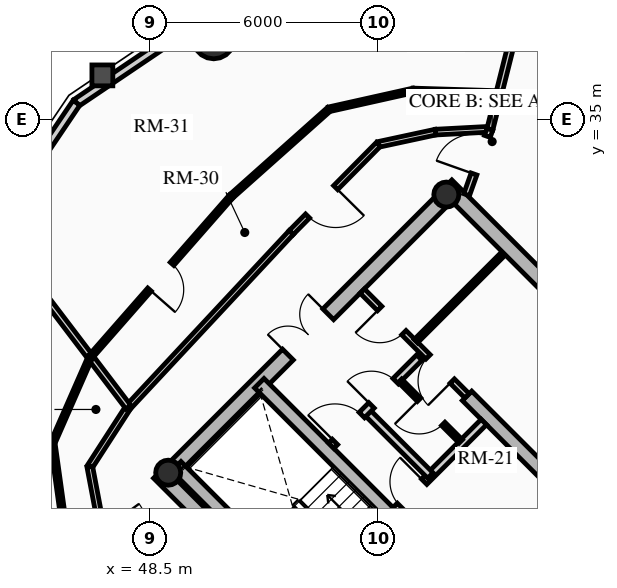
"""IFC4 building model, lengths in metres.
Left out: names, types, materials, properties, quantities, classifications, styles, units other than length and angle.
Written with IfcOpenShell. Run it as: python <this file> out.ifc"""

import sys

from ifc_helpers import new_model, si_unit, direction, frame, frame_2d, origin, origin_2d, place, context, subcontext, project, spatial, rectangle, circle, hollow_circle, extrude, source, transform, mapped, element, fill, save


model = new_model("IFC4")
c1 = context("Model", 3, precision=1e-05, world=origin(), true_north=direction((0.0, 1.0)))
c2 = subcontext(c1, "Body", "Model", "MODEL_VIEW")
j1 = project(units=[si_unit("LENGTHUNIT", "METRE"), si_unit("PLANEANGLEUNIT", "RADIAN")], contexts=[c1])
p1 = place(None, origin())
s1 = spatial("IfcSite", under=j1, at=p1, CompositionType="ELEMENT")
p2 = place(p1, origin())
s2 = spatial("IfcBuilding", under=s1, at=p2, CompositionType="ELEMENT")
p3 = place(p2, frame((0.0, 0.0, 222.85)))
s3 = spatial("IfcBuildingStorey", under=s2, at=p3, CompositionType="ELEMENT", Elevation=222.85)
for number, where, z_axis, x_axis in (
    (1, (58.702, 15.732, 0.0), (0.0, 0.0, 1.0), (-0.707, 0.707, 0.0)),
    (2, (66.268, 23.298, 0.0), (0.0, 0.0, 1.0), (-0.707, 0.707, 0.0)),
):
    element("IfcWall", number, at=place(p3, frame(where, z_axis=z_axis, x_axis=x_axis)), inside=s3, PredefinedType="SHEAR", context=c2, shape_type="SweptSolid", body=[
        extrude(rectangle(XDim=14.1, YDim=0.4, at=frame_2d((7.05, 0.0))), origin(), (0.0, 0.0, 1.0), 3.2),
    ])
p4 = place(p3, frame((48.873, 25.561, 0.0), z_axis=(0.0, 0.0, 1.0), x_axis=(0.707106781187, 0.707106781187, 0.0)))
e3 = element("IfcWall", 3, at=p4, inside=s3, PredefinedType="SHEAR", context=c2, shape_type="SweptSolid", body=[
    extrude(rectangle(XDim=10.7, YDim=0.4, at=frame_2d((5.35, 0.0))), origin(), (0.0, 0.0, 1.0), 3.2),
])
m1 = source(origin(), c2, "Body", "SweptSolid", [
    extrude(rectangle(XDim=1.5, YDim=2.02, at=frame_2d((0.75, 1.01))), frame((0.0, 0.21, 0.0), z_axis=(0.0, -1.0, 0.0), x_axis=(1.0, 0.0, 0.0)), (0.0, 0.0, 1.0), 0.42),
])
p5 = place(p4, frame((4.6, 0.0, 0.0)))
e4 = element("IfcOpeningElement", 4, at=p5, cuts=e3, PredefinedType="OPENING", context=c2, shape_type="MappedRepresentation", body=[
    mapped(m1, transform((0.0, 0.0, 0.0), x_axis=(1.0, 0.0, 0.0), y_axis=(0.0, 1.0, 0.0), z_axis=(0.0, 0.0, 1.0), scale=1.0)),
])
p6 = place(p3, frame((61.06, 18.373, 0.0), z_axis=(0.0, 0.0, 1.0), x_axis=(-0.707106781187, 0.707106781187, 0.0)))
e5 = element("IfcWall", 5, at=p6, inside=s3, PredefinedType="SHEAR", context=c2, shape_type="SweptSolid", body=[
    extrude(rectangle(XDim=13.7, YDim=0.35, at=frame_2d((6.85, 0.0))), origin(), (0.0, 0.0, 1.0), 3.2),
])
m2 = source(origin(), c2, "Body", "SweptSolid", [
    extrude(rectangle(XDim=1.1, YDim=2.015, at=frame_2d((0.55, 1.007))), frame((0.0, 0.185, 0.0), z_axis=(0.0, -1.0, 0.0), x_axis=(1.0, 0.0, 0.0)), (0.0, 0.0, 1.0), 0.37),
])
p7 = place(p6, frame((4.85, 0.0, 0.0)))
e6 = element("IfcOpeningElement", 6, at=p7, cuts=e5, PredefinedType="OPENING", context=c2, shape_type="MappedRepresentation", body=[
    mapped(m2, transform((0.0, 0.0, 0.0), x_axis=(1.0, 0.0, 0.0), y_axis=(0.0, 1.0, 0.0), z_axis=(0.0, 0.0, 1.0), scale=1.0)),
])
p8 = place(p6, frame((0.625, 0.0, 0.0)))
e7 = element("IfcOpeningElement", 7, at=p8, cuts=e5, PredefinedType="OPENING", context=c2, shape_type="MappedRepresentation", body=[
    mapped(m2, transform((0.0, 0.0, 0.0), x_axis=(1.0, 0.0, 0.0), y_axis=(0.0, 1.0, 0.0), z_axis=(0.0, 0.0, 1.0), scale=1.0)),
])
p9 = place(p6, frame((2.625, 0.0, 0.0)))
e8 = element("IfcOpeningElement", 8, at=p9, cuts=e5, PredefinedType="OPENING", context=c2, shape_type="MappedRepresentation", body=[
    mapped(m2, transform((0.0, 0.0, 0.0), x_axis=(1.0, 0.0, 0.0), y_axis=(0.0, 1.0, 0.0), z_axis=(0.0, 0.0, 1.0), scale=1.0)),
])
m3 = source(origin(), c2, "Body", "SweptSolid", [
    extrude(rectangle(XDim=1.15, YDim=2.02, at=frame_2d((0.575, 1.01))), frame((0.0, 0.185, 0.0), z_axis=(0.0, -1.0, 0.0), x_axis=(1.0, 0.0, 0.0)), (0.0, 0.0, 1.0), 0.37),
])
p10 = place(p6, frame((7.27, 0.0, 0.0)))
e9 = element("IfcOpeningElement", 9, at=p10, cuts=e5, PredefinedType="OPENING", context=c2, shape_type="MappedRepresentation", body=[
    mapped(m3, transform((0.0, 0.0, 0.0), x_axis=(1.0, 0.0, 0.0), y_axis=(0.0, 1.0, 0.0), z_axis=(0.0, 0.0, 1.0), scale=1.0)),
])
p11 = place(p3, frame((63.627, 20.94, 0.0), z_axis=(0.0, 0.0, 1.0), x_axis=(-0.707119496762, 0.707094065383, 0.0)))
e10 = element("IfcWall", 10, at=p11, inside=s3, PredefinedType="SHEAR", context=c2, shape_type="SweptSolid", body=[
    extrude(rectangle(XDim=9.6, YDim=0.35, at=frame_2d((4.8, 0.0))), origin(), (0.0, 0.0, 1.0), 3.2),
])
p12 = place(p11, frame((5.28, 0.0, 0.0)))
e11 = element("IfcOpeningElement", 11, at=p12, cuts=e10, PredefinedType="OPENING", context=c2, shape_type="MappedRepresentation", body=[
    mapped(m3, transform((0.0, 0.0, 0.0), x_axis=(1.0, 0.0, 0.0), y_axis=(0.0, 1.0, 0.0), z_axis=(0.0, 0.0, 1.0), scale=1.0)),
])
p13 = place(p3, frame((53.922, 21.141, 0.0), z_axis=(0.0, 0.0, 1.0), x_axis=(-0.707106781187, 0.707106781187, 0.0)))
e12 = element("IfcWall", 12, at=p13, inside=s3, PredefinedType="SHEAR", context=c2, shape_type="SweptSolid", body=[
    extrude(rectangle(XDim=6.695, YDim=0.35, at=frame_2d((3.348, 0.0))), origin(), (0.0, 0.0, 1.0), 3.2),
])
for number, where, z_axis, x_axis in (
    (13, (48.976, 25.706, 0.0), (0.0, 0.0, 1.0), (0.707, 0.707, 0.0)),
    (14, (56.294, 33.024, 0.0), (0.0, 0.0, 1.0), (0.707, 0.707, 0.0)),
):
    element("IfcColumn", number, at=place(p3, frame(where, z_axis=z_axis, x_axis=x_axis)), inside=s3, PredefinedType="COLUMN", context=c2, shape_type="SweptSolid", body=[
        extrude(hollow_circle(Radius=0.33, WallThickness=0.025, at=origin_2d()), origin(), (0.0, 0.0, 1.0), 3.2),
    ])
p14 = place(p3, frame((50.173, 37.146, 0.0), z_axis=(0.0, 0.0, 1.0), x_axis=(1.0, 0.0, 0.0)))
e15 = element("IfcColumn", 15, at=p14, inside=s3, PredefinedType="USERDEFINED", context=c2, shape_type="SweptSolid", body=[
    extrude(circle(Radius=0.55, at=origin_2d()), origin(), (0.0, 0.0, 1.0), 3.2),
])
p15 = place(p3, frame((46.561, 35.439, 0.0), z_axis=(0.0, 0.0, 1.0), x_axis=(0.828833723692, 0.559495003079, 0.0)))
e16 = element("IfcWall", 16, at=p15, inside=s3, PredefinedType="SOLIDWALL", context=c2, shape_type="SweptSolid", body=[
    extrude(rectangle(XDim=3.976, YDim=0.22, at=frame_2d((1.988, 0.0))), origin(), (0.0, 0.0, 1.0), 2.612),
])
p16 = place(p3, frame((44.337, 32.144, 0.0), z_axis=(0.0, 0.0, 1.0), x_axis=(0.559495003079, 0.828833723692, 0.0)))
e17 = element("IfcWall", 17, at=p16, inside=s3, PredefinedType="SOLIDWALL", context=c2, shape_type="SweptSolid", body=[
    extrude(rectangle(XDim=3.976, YDim=0.22, at=frame_2d((1.988, 0.0))), origin(), (0.0, 0.0, 1.0), 2.612),
])
m4 = source(origin(), c2, "Body", "SweptSolid", [
    extrude(rectangle(XDim=1.05, YDim=1.3, at=frame_2d((0.525, 0.65))), frame((0.0, 0.12, 0.0), z_axis=(0.0, -1.0, 0.0), x_axis=(1.0, 0.0, 0.0)), (0.0, 0.0, 1.0), 0.24),
])
p17 = place(p16, frame((1.463, 0.0, 0.65)))
e18 = element("IfcOpeningElement", 18, at=p17, cuts=e17, PredefinedType="OPENING", context=c2, shape_type="MappedRepresentation", body=[
    mapped(m4, transform((0.0, 0.0, 0.0), x_axis=(1.0, 0.0, 0.0), y_axis=(0.0, 1.0, 0.0), z_axis=(0.0, 0.0, 1.0), scale=1.0)),
])
p18 = place(p3, frame((54.961, 24.719, 0.0), z_axis=(0.0, 0.0, 1.0), x_axis=(0.707106781187, 0.707106781187, 0.0)))
e19 = element("IfcWall", 19, at=p18, inside=s3, PredefinedType="PARTITIONING", context=c2, shape_type="SweptSolid", body=[
    extrude(rectangle(XDim=3.28, YDim=0.2, at=frame_2d((1.64, 0.0))), origin(), (0.0, 0.0, 1.0), 2.975),
])
m5 = source(origin(), c2, "Body", "SweptSolid", [
    extrude(rectangle(XDim=0.9, YDim=2.005, at=frame_2d((0.45, 1.002))), frame((0.0, 0.11, 0.0), z_axis=(0.0, -1.0, 0.0), x_axis=(1.0, 0.0, 0.0)), (0.0, 0.0, 1.0), 0.22),
])
p19 = place(p18, frame((0.16, 0.0, 0.0)))
e20 = element("IfcOpeningElement", 20, at=p19, cuts=e19, PredefinedType="OPENING", context=c2, shape_type="MappedRepresentation", body=[
    mapped(m5, transform((0.0, 0.0, 0.0), x_axis=(1.0, 0.0, 0.0), y_axis=(0.0, 1.0, 0.0), z_axis=(0.0, 0.0, 1.0), scale=1.0)),
])
p20 = place(p3, frame((55.874, 25.631, 0.0), z_axis=(0.0, 0.0, 1.0), x_axis=(-0.707157639372, 0.707055919343, 0.0)))
e21 = element("IfcWall", 21, at=p20, inside=s3, PredefinedType="PARTITIONING", context=c2, shape_type="SweptSolid", body=[
    extrude(rectangle(XDim=2.4, YDim=0.2, at=frame_2d((1.2, 0.0))), origin(), (0.0, 0.0, 1.0), 2.975),
])
p21 = place(p3, frame((53.264, 26.416, 0.0), z_axis=(0.0, 0.0, 1.0), x_axis=(0.707106781187, 0.707106781187, 0.0)))
e22 = element("IfcWall", 22, at=p21, inside=s3, PredefinedType="PARTITIONING", context=c2, shape_type="SweptSolid", body=[
    extrude(rectangle(XDim=3.28, YDim=0.2, at=frame_2d((1.64, 0.0))), origin(), (0.0, 0.0, 1.0), 2.975),
])
m6 = source(origin(), c2, "Body", "SweptSolid", [
    extrude(rectangle(XDim=1.0, YDim=2.015, at=frame_2d((0.5, 1.007))), frame((0.0, 0.11, 0.0), z_axis=(0.0, -1.0, 0.0), x_axis=(1.0, 0.0, 0.0)), (0.0, 0.0, 1.0), 0.22),
])
p22 = place(p21, frame((0.14, 0.0, 0.0)))
e23 = element("IfcOpeningElement", 23, at=p22, cuts=e22, PredefinedType="OPENING", context=c2, shape_type="MappedRepresentation", body=[
    mapped(m6, transform((0.0, 0.0, 0.0), x_axis=(1.0, 0.0, 0.0), y_axis=(0.0, 1.0, 0.0), z_axis=(0.0, 0.0, 1.0), scale=1.0)),
])
p23 = place(p21, frame((1.5, 0.0, 0.0)))
e24 = element("IfcOpeningElement", 24, at=p23, cuts=e22, PredefinedType="OPENING", context=c2, shape_type="MappedRepresentation", body=[
    mapped(m5, transform((0.0, 0.0, 0.0), x_axis=(1.0, 0.0, 0.0), y_axis=(0.0, 1.0, 0.0), z_axis=(0.0, 0.0, 1.0), scale=1.0)),
])
p24 = place(p3, frame((56.673, 26.529, 0.0), z_axis=(0.0, 0.0, 1.0), x_axis=(-0.707052764397, 0.70716079385, 0.0)))
e25 = element("IfcWall", 25, at=p24, inside=s3, PredefinedType="PARTITIONING", context=c2, shape_type="SweptSolid", body=[
    extrude(rectangle(XDim=2.26, YDim=0.125, at=frame_2d((1.13, 0.0))), origin(), (0.0, 0.0, 1.0), 2.975),
])
m7 = source(origin(), c2, "Body", "SweptSolid", [
    extrude(rectangle(XDim=0.9, YDim=2.005, at=frame_2d((0.45, 1.002))), frame((0.0, 0.073, 0.0), z_axis=(0.0, -1.0, 0.0), x_axis=(1.0, 0.0, 0.0)), (0.0, 0.0, 1.0), 0.145),
])
p25 = place(p24, frame((0.65, 0.0, 0.0)))
e26 = element("IfcOpeningElement", 26, at=p25, cuts=e25, PredefinedType="OPENING", context=c2, shape_type="MappedRepresentation", body=[
    mapped(m7, transform((0.0, 0.0, 0.0), x_axis=(1.0, 0.0, 0.0), y_axis=(0.0, 1.0, 0.0), z_axis=(0.0, 0.0, 1.0), scale=1.0)),
])
p26 = place(p3, frame((56.839, 27.728, 0.0), z_axis=(0.0, 0.0, 1.0), x_axis=(-0.707106781187, 0.707106781187, 0.0)))
e27 = element("IfcWall", 27, at=p26, inside=s3, PredefinedType="PARTITIONING", context=c2, shape_type="SweptSolid", body=[
    extrude(rectangle(XDim=3.9, YDim=0.16, at=frame_2d((1.95, 0.0))), origin(), (0.0, 0.0, 1.0), 2.975),
])
m8 = source(origin(), c2, "Body", "SweptSolid", [
    extrude(rectangle(XDim=0.9, YDim=2.005, at=frame_2d((0.45, 1.002))), frame((0.0, 0.09, 0.0), z_axis=(0.0, -1.0, 0.0), x_axis=(1.0, 0.0, 0.0)), (0.0, 0.0, 1.0), 0.18),
])
p27 = place(p26, frame((0.55, 0.0, 0.0)))
e28 = element("IfcOpeningElement", 28, at=p27, cuts=e27, PredefinedType="OPENING", context=c2, shape_type="MappedRepresentation", body=[
    mapped(m8, transform((0.0, 0.0, 0.0), x_axis=(1.0, 0.0, 0.0), y_axis=(0.0, 1.0, 0.0), z_axis=(0.0, 0.0, 1.0), scale=1.0)),
])
p28 = place(p26, frame((2.35, 0.0, 0.0)))
e29 = element("IfcOpeningElement", 29, at=p28, cuts=e27, PredefinedType="OPENING", context=c2, shape_type="MappedRepresentation", body=[
    mapped(m8, transform((0.0, 0.0, 0.0), x_axis=(1.0, 0.0, 0.0), y_axis=(0.0, 1.0, 0.0), z_axis=(0.0, 0.0, 1.0), scale=1.0)),
])
p29 = place(p3, frame((55.492, 29.167, 0.0), z_axis=(0.0, 0.0, 1.0), x_axis=(0.707144688645, 0.707068871696, 0.0)))
e30 = element("IfcWall", 30, at=p29, inside=s3, PredefinedType="PARTITIONING", context=c2, shape_type="SweptSolid", body=[
    extrude(rectangle(XDim=3.22, YDim=0.125, at=frame_2d((1.61, 0.0))), origin(), (0.0, 0.0, 1.0), 2.512),
])
p30 = place(p3, frame((57.44, 34.744, 0.0), z_axis=(0.0, 0.0, 1.0), x_axis=(-0.998578025565, -0.053309725738, 0.0)))
e31 = element("IfcWall", 31, at=p30, inside=s3, PredefinedType="PARTITIONING", context=c2, shape_type="SweptSolid", body=[
    extrude(rectangle(XDim=1.433, YDim=0.15, at=frame_2d((0.717, 0.0))), origin(), (0.0, 0.0, 1.0), 2.612),
])
p31 = place(p3, frame((56.009, 34.667, 0.0), z_axis=(0.0, 0.0, 1.0), x_axis=(-0.977625498152, -0.210353001795, 0.0)))
e32 = element("IfcWall", 32, at=p31, inside=s3, PredefinedType="PARTITIONING", context=c2, shape_type="SweptSolid", body=[
    extrude(rectangle(XDim=1.538, YDim=0.15, at=frame_2d((0.769, 0.0))), origin(), (0.0, 0.0, 1.0), 2.545),
])
p32 = place(p3, frame((54.506, 34.344, 0.0), z_axis=(0.0, 0.0, 1.0), x_axis=(-0.703053402247, -0.711137056824, 0.0)))
e33 = element("IfcWall", 33, at=p32, inside=s3, PredefinedType="PARTITIONING", context=c2, shape_type="SweptSolid", body=[
    extrude(rectangle(XDim=3.262, YDim=0.15, at=frame_2d((1.631, 0.0))), origin(), (0.0, 0.0, 1.0), 2.612),
])
m9 = source(origin(), c2, "Body", "SweptSolid", [
    extrude(rectangle(XDim=1.05, YDim=2.015, at=frame_2d((0.525, 1.007))), frame((0.0, 0.085, 0.0), z_axis=(0.0, -1.0, 0.0), x_axis=(1.0, 0.0, 0.0)), (0.0, 0.0, 1.0), 0.17),
])
p33 = place(p32, frame((1.599, 0.0, 0.0)))
e34 = element("IfcOpeningElement", 34, at=p33, cuts=e33, PredefinedType="OPENING", context=c2, shape_type="MappedRepresentation", body=[
    mapped(m9, transform((0.0, 0.0, 0.0), x_axis=(1.0, 0.0, 0.0), y_axis=(0.0, 1.0, 0.0), z_axis=(0.0, 0.0, 1.0), scale=1.0)),
])
p34 = place(p3, frame((52.212, 32.024, 0.0), z_axis=(0.0, 0.0, 1.0), x_axis=(-0.682158998173, -0.731203871169, 0.0)))
e35 = element("IfcWall", 35, at=p34, inside=s3, PredefinedType="PARTITIONING", context=c2, shape_type="SweptSolid", body=[
    extrude(rectangle(XDim=6.282, YDim=0.15, at=frame_2d((3.141, 0.0))), origin(), (0.0, 0.0, 1.0), 2.545),
])
p35 = place(p3, frame((47.927, 27.431, 0.0), z_axis=(0.0, 0.0, 1.0), x_axis=(-0.543126643356, -0.839650790077, 0.0)))
e36 = element("IfcWall", 36, at=p35, inside=s3, PredefinedType="PARTITIONING", context=c2, shape_type="SweptSolid", body=[
    extrude(rectangle(XDim=1.868, YDim=0.15, at=frame_2d((0.934, 0.0))), origin(), (0.0, 0.0, 1.0), 2.545),
])
p36 = place(p3, frame((46.912, 25.862, 0.0), z_axis=(0.0, 0.0, 1.0), x_axis=(0.186095172215, -0.98253172309, 0.0)))
e37 = element("IfcWall", 37, at=p36, inside=s3, PredefinedType="PARTITIONING", context=c2, shape_type="SweptSolid", body=[
    extrude(rectangle(XDim=1.346, YDim=0.15, at=frame_2d((0.673, 0.0))), origin(), (0.0, 0.0, 1.0), 2.612),
])
p37 = place(p3, frame((57.44, 34.744, 0.0), z_axis=(0.0, 0.0, 1.0), x_axis=(0.243619816457, 0.969870808422, 0.0)))
e38 = element("IfcWall", 38, at=p37, inside=s3, PredefinedType="PARTITIONING", context=c2, shape_type="SweptSolid", body=[
    extrude(rectangle(XDim=3.496, YDim=0.16, at=frame_2d((1.748, 0.0))), origin(), (0.0, 0.0, 1.0), 2.612),
])
p38 = place(p3, frame((47.927, 27.431, 0.0), z_axis=(0.0, 0.0, 1.0), x_axis=(-0.604823333103, 0.796359677366, 0.0)))
e39 = element("IfcWall", 39, at=p38, inside=s3, PredefinedType="PARTITIONING", context=c2, shape_type="SweptSolid", body=[
    extrude(rectangle(XDim=5.907, YDim=0.16, at=frame_2d((2.953, 0.0))), origin(), (0.0, 0.0, 1.0), 2.612),
])
p39 = place(p3, frame((56.828, 33.021, 0.0), z_axis=(0.0, 0.0, 1.0), x_axis=(0.334788446034, 0.942293317605, 0.0)))
e40 = element("IfcWall", 40, at=p39, inside=s3, PredefinedType="PARTITIONING", context=c2, shape_type="SweptSolid", body=[
    extrude(rectangle(XDim=1.829, YDim=0.16, at=frame_2d((0.915, 0.0))), origin(), (0.0, 0.0, 1.0), 2.545),
])
m10 = source(origin(), c2, "Body", "SweptSolid", [
    extrude(rectangle(XDim=1.05, YDim=2.015, at=frame_2d((0.525, 1.007))), frame((0.0, 0.09, 0.0), z_axis=(0.0, -1.0, 0.0), x_axis=(1.0, 0.0, 0.0)), (0.0, 0.0, 1.0), 0.18),
])
p40 = place(p39, frame((0.579, 0.0, 0.0)))
e41 = element("IfcOpeningElement", 41, at=p40, cuts=e40, PredefinedType="OPENING", context=c2, shape_type="MappedRepresentation", body=[
    mapped(m10, transform((0.0, 0.0, 0.0), x_axis=(1.0, 0.0, 0.0), y_axis=(0.0, 1.0, 0.0), z_axis=(0.0, 0.0, 1.0), scale=1.0)),
])
p41 = place(p3, frame((57.679, 35.693, 0.0), z_axis=(0.0, 0.0, 1.0), x_axis=(-0.999526298938, 0.030776252722, 0.0)))
e42 = element("IfcWall", 42, at=p41, inside=s3, PredefinedType="PARTITIONING", context=c2, shape_type="SweptSolid", body=[
    extrude(rectangle(XDim=2.261, YDim=0.125, at=frame_2d((1.13, 0.0))), origin(), (0.0, 0.0, 1.0), 2.612),
])
p42 = place(p3, frame((55.419, 35.763, 0.0), z_axis=(0.0, 0.0, 1.0), x_axis=(-0.975917771425, -0.218138725166, 0.0)))
e43 = element("IfcWall", 43, at=p42, inside=s3, PredefinedType="PARTITIONING", context=c2, shape_type="SweptSolid", body=[
    extrude(rectangle(XDim=2.268, YDim=0.125, at=frame_2d((1.134, 0.0))), origin(), (0.0, 0.0, 1.0), 2.545),
])
p43 = place(p3, frame((53.206, 35.268, 0.0), z_axis=(0.0, 0.0, 1.0), x_axis=(-0.746677760999, -0.665185929819, 0.0)))
e44 = element("IfcWall", 44, at=p43, inside=s3, PredefinedType="PARTITIONING", context=c2, shape_type="SweptSolid", body=[
    extrude(rectangle(XDim=3.445, YDim=0.125, at=frame_2d((1.723, 0.0))), origin(), (0.0, 0.0, 1.0), 2.612),
])
p44 = place(p3, frame((50.634, 32.977, 0.0), z_axis=(0.0, 0.0, 1.0), x_axis=(-0.659241945747, -0.751930885765, 0.0)))
e45 = element("IfcWall", 45, at=p44, inside=s3, PredefinedType="PARTITIONING", context=c2, shape_type="SweptSolid", body=[
    extrude(rectangle(XDim=5.624, YDim=0.125, at=frame_2d((2.812, 0.0))), origin(), (0.0, 0.0, 1.0), 2.545),
])
p45 = place(p44, frame((2.362, 0.0, 0.0)))
e46 = element("IfcOpeningElement", 46, at=p45, cuts=e45, PredefinedType="OPENING", context=c2, shape_type="MappedRepresentation", body=[
    mapped(m7, transform((0.0, 0.0, 0.0), x_axis=(1.0, 0.0, 0.0), y_axis=(0.0, 1.0, 0.0), z_axis=(0.0, 0.0, 1.0), scale=1.0)),
])
p46 = place(p3, frame((46.927, 28.748, 0.0), z_axis=(0.0, 0.0, 1.0), x_axis=(-0.401820136661, -0.91571861277, 0.0)))
e47 = element("IfcWall", 47, at=p46, inside=s3, PredefinedType="PARTITIONING", context=c2, shape_type="SweptSolid", body=[
    extrude(rectangle(XDim=2.468, YDim=0.125, at=frame_2d((1.234, 0.0))), origin(), (0.0, 0.0, 1.0), 2.545),
])
p47 = place(p3, frame((45.935, 26.488, 0.0), z_axis=(0.0, 0.0, 1.0), x_axis=(0.138347758345, -0.990383712387, 0.0)))
e48 = element("IfcWall", 48, at=p47, inside=s3, PredefinedType="PARTITIONING", context=c2, shape_type="SweptSolid", body=[
    extrude(rectangle(XDim=2.202, YDim=0.125, at=frame_2d((1.101, 0.0))), origin(), (0.0, 0.0, 1.0), 2.612),
])
m11 = source(origin(), c2, "Body", "SweptSolid", [
    extrude(rectangle(XDim=1.5, YDim=2.02, at=frame_2d((0.75, 1.01))), frame((0.0, 0.025, 0.0), z_axis=(0.0, -1.0, 0.0), x_axis=(1.0, 0.0, 0.0)), (0.0, 0.0, 1.0), 0.05),
])
p48 = place(p5, origin())
e49 = element("IfcDoor", 49, at=p48, inside=s3, OperationType="DOUBLE_DOOR_SINGLE_SWING", PredefinedType="DOOR", context=c2, shape_type="MappedRepresentation", body=[
    mapped(m11, transform((0.0, 0.0, 0.0), x_axis=(1.0, 0.0, 0.0), y_axis=(0.0, 1.0, 0.0), z_axis=(0.0, 0.0, 1.0), scale=1.0)),
])
fill(e4, e49)
m12 = source(origin(), c2, "Body", "SweptSolid", [
    extrude(rectangle(XDim=0.9, YDim=2.005, at=frame_2d((0.45, 1.002))), frame((0.0, 0.025, 0.0), z_axis=(0.0, -1.0, 0.0), x_axis=(1.0, 0.0, 0.0)), (0.0, 0.0, 1.0), 0.05),
])
p49 = place(p19, origin())
e50 = element("IfcDoor", 50, at=p49, inside=s3, OperationType="SINGLE_SWING_RIGHT", PredefinedType="DOOR", context=c2, shape_type="MappedRepresentation", body=[
    mapped(m12, transform((0.0, 0.0, 0.0), x_axis=(1.0, 0.0, 0.0), y_axis=(0.0, 1.0, 0.0), z_axis=(0.0, 0.0, 1.0), scale=1.0)),
])
fill(e20, e50)
m13 = source(origin(), c2, "Body", "SweptSolid", [
    extrude(rectangle(XDim=1.0, YDim=2.015, at=frame_2d((0.5, 1.007))), frame((0.0, 0.025, 0.0), z_axis=(0.0, -1.0, 0.0), x_axis=(1.0, 0.0, 0.0)), (0.0, 0.0, 1.0), 0.05),
])
p50 = place(p22, origin())
e51 = element("IfcDoor", 51, at=p50, inside=s3, OperationType="SINGLE_SWING_LEFT", PredefinedType="DOOR", context=c2, shape_type="MappedRepresentation", body=[
    mapped(m13, transform((0.0, 0.0, 0.0), x_axis=(1.0, 0.0, 0.0), y_axis=(0.0, 1.0, 0.0), z_axis=(0.0, 0.0, 1.0), scale=1.0)),
])
fill(e23, e51)
p51 = place(p23, origin())
e52 = element("IfcDoor", 52, at=p51, inside=s3, OperationType="SINGLE_SWING_LEFT", PredefinedType="DOOR", context=c2, shape_type="MappedRepresentation", body=[
    mapped(m12, transform((0.0, 0.0, 0.0), x_axis=(1.0, 0.0, 0.0), y_axis=(0.0, 1.0, 0.0), z_axis=(0.0, 0.0, 1.0), scale=1.0)),
])
fill(e24, e52)
p52 = place(p25, origin())
e53 = element("IfcDoor", 53, at=p52, inside=s3, OperationType="SINGLE_SWING_RIGHT", PredefinedType="DOOR", context=c2, shape_type="MappedRepresentation", body=[
    mapped(m12, transform((0.0, 0.0, 0.0), x_axis=(1.0, 0.0, 0.0), y_axis=(0.0, 1.0, 0.0), z_axis=(0.0, 0.0, 1.0), scale=1.0)),
])
fill(e26, e53)
p53 = place(p27, origin())
e54 = element("IfcDoor", 54, at=p53, inside=s3, OperationType="SINGLE_SWING_LEFT", PredefinedType="DOOR", context=c2, shape_type="MappedRepresentation", body=[
    mapped(m12, transform((0.0, 0.0, 0.0), x_axis=(1.0, 0.0, 0.0), y_axis=(0.0, 1.0, 0.0), z_axis=(0.0, 0.0, 1.0), scale=1.0)),
])
fill(e28, e54)
p54 = place(p28, origin())
e55 = element("IfcDoor", 55, at=p54, inside=s3, OperationType="SINGLE_SWING_RIGHT", PredefinedType="DOOR", context=c2, shape_type="MappedRepresentation", body=[
    mapped(m12, transform((0.0, 0.0, 0.0), x_axis=(1.0, 0.0, 0.0), y_axis=(0.0, 1.0, 0.0), z_axis=(0.0, 0.0, 1.0), scale=1.0)),
])
fill(e29, e55)
m14 = source(origin(), c2, "Body", "SweptSolid", [
    extrude(rectangle(XDim=1.05, YDim=2.015, at=frame_2d((0.525, 1.007))), frame((0.0, 0.025, 0.0), z_axis=(0.0, -1.0, 0.0), x_axis=(1.0, 0.0, 0.0)), (0.0, 0.0, 1.0), 0.05),
])
p55 = place(p40, origin())
e56 = element("IfcDoor", 56, at=p55, inside=s3, OperationType="SINGLE_SWING_LEFT", PredefinedType="DOOR", context=c2, shape_type="MappedRepresentation", body=[
    mapped(m14, transform((0.0, 0.0, 0.0), x_axis=(1.0, 0.0, 0.0), y_axis=(0.0, 1.0, 0.0), z_axis=(0.0, 0.0, 1.0), scale=1.0)),
])
fill(e41, e56)
p56 = place(p33, origin())
e57 = element("IfcDoor", 57, at=p56, inside=s3, OperationType="SINGLE_SWING_LEFT", PredefinedType="DOOR", context=c2, shape_type="MappedRepresentation", body=[
    mapped(m14, transform((0.0, 0.0, 0.0), x_axis=(1.0, 0.0, 0.0), y_axis=(0.0, 1.0, 0.0), z_axis=(0.0, 0.0, 1.0), scale=1.0)),
])
fill(e34, e57)
p57 = place(p45, origin())
e58 = element("IfcDoor", 58, at=p57, inside=s3, OperationType="SINGLE_SWING_RIGHT", PredefinedType="DOOR", context=c2, shape_type="MappedRepresentation", body=[
    mapped(m12, transform((0.0, 0.0, 0.0), x_axis=(1.0, 0.0, 0.0), y_axis=(0.0, 1.0, 0.0), z_axis=(0.0, 0.0, 1.0), scale=1.0)),
])
fill(e46, e58)
save(model, sys.argv[1])
